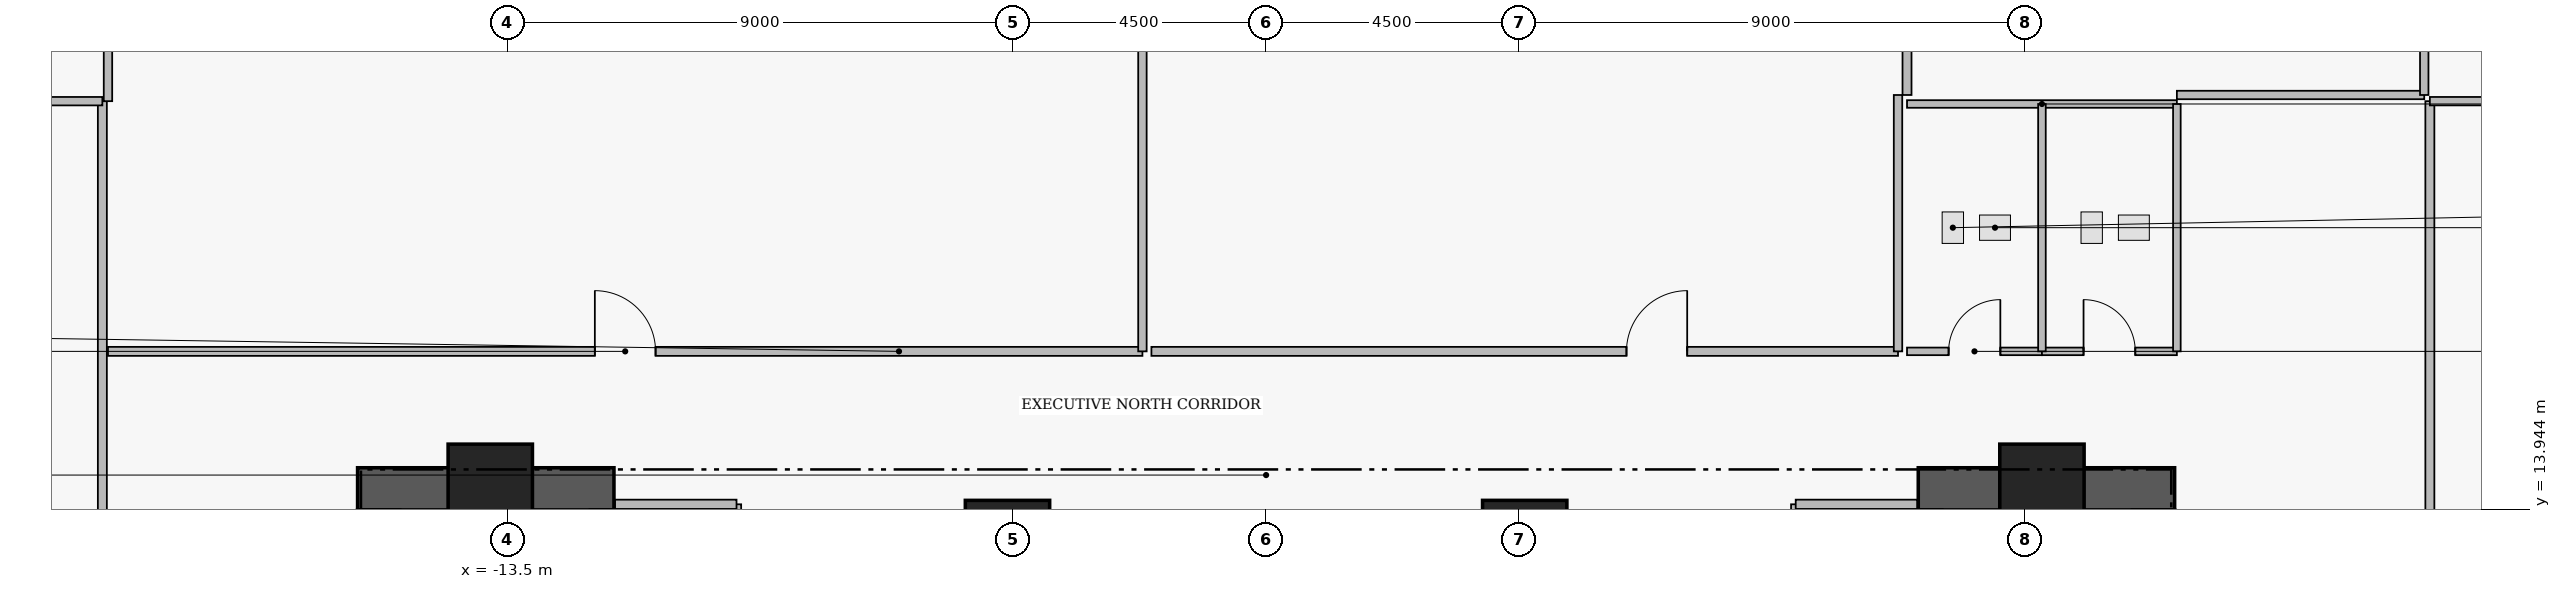
"""IFC4 building model, lengths in metres.
Left out: names, types, materials, properties, quantities, classifications, styles, units other than length and angle.
Written with IfcOpenShell. Run it as: python <this file> out.ifc"""

import sys

from ifc_helpers import new_model, si_unit, direction, frame, frame_2d, origin, origin_2d, place, context, subcontext, project, spatial, rectangle, extrude, element, fill, save


model = new_model("IFC4")
c1 = context("Model", 3, precision=1e-05, world=origin(), true_north=direction((0.0, 1.0)))
c2 = subcontext(c1, "Body", "Model", "MODEL_VIEW")
j1 = project(units=[si_unit("LENGTHUNIT", "METRE"), si_unit("PLANEANGLEUNIT", "RADIAN")], contexts=[c1])
p1 = place(None, origin())
s1 = spatial("IfcSite", under=j1, at=p1, CompositionType="ELEMENT")
p2 = place(p1, origin())
s2 = spatial("IfcBuilding", under=s1, at=p2, CompositionType="ELEMENT")
p3 = place(p2, frame((0.0, 0.0, 154.05)))
s3 = spatial("IfcBuildingStorey", under=s2, at=p3, CompositionType="ELEMENT", Elevation=154.05)
for number, where, z_axis, x_axis in (
    (1, (-16.16, 14.305, 0.0), (0.0, 0.0, 1.0), (1.0, 0.0, 0.0)),
    (2, (11.6, 14.305, 0.0), (0.0, 0.0, 1.0), (1.0, 0.0, 0.0)),
):
    element("IfcWall", number, at=place(p3, frame(where, z_axis=z_axis, x_axis=x_axis)), inside=s3, PredefinedType="SHEAR", context=c2, shape_type="SweptSolid", body=[
        extrude(rectangle(XDim=4.56, YDim=0.75, at=frame_2d((2.28, 0.0))), origin(), (0.0, 0.0, 1.0), 4.31),
    ])
for number, where, z_axis, x_axis in (
    (3, (-13.8, 14.35, 0.0), (0.0, 0.0, 1.0), (1.0, 0.0, 0.0)),
    (4, (-4.6, 13.35, 0.0), (0.0, 0.0, 1.0), (1.0, 0.0, 0.0)),
    (5, (4.6, 13.35, 0.0), (0.0, 0.0, 1.0), (1.0, 0.0, 0.0)),
    (6, (13.8, 14.35, 0.0), (0.0, 0.0, 1.0), (1.0, 0.0, 0.0)),
):
    element("IfcColumn", number, at=place(p3, frame(where, z_axis=z_axis, x_axis=x_axis)), inside=s3, PredefinedType="COLUMN", context=c2, shape_type="SweptSolid", body=[
        extrude(rectangle(XDim=1.5, YDim=1.5, at=origin_2d()), origin(), (0.0, 0.0, 1.0), 4.5),
    ])
p4 = place(p3, frame((-20.6, 16.75, 0.0), z_axis=(0.0, 0.0, 1.0), x_axis=(1.0, 0.0, 0.0)))
e7 = element("IfcWall", 7, at=p4, inside=s3, PredefinedType="PARTITIONING", context=c2, shape_type="SweptSolid", body=[
    extrude(rectangle(XDim=18.4, YDim=0.16, at=frame_2d((9.2, 0.0))), origin(), (0.0, 0.0, 1.0), 3.823),
])
p5 = place(p4, frame((8.66, 0.0, 0.0)))
e8 = element("IfcOpeningElement", 8, at=p5, cuts=e7, PredefinedType="OPENING", context=c2, shape_type="SweptSolid", body=[
    extrude(rectangle(XDim=1.08, YDim=2.18, at=frame_2d((0.54, 1.09))), frame((0.0, 0.09, 0.0), z_axis=(0.0, -1.0, 0.0), x_axis=(1.0, 0.0, 0.0)), (0.0, 0.0, 1.0), 0.18),
])
p6 = place(p3, frame((-2.04, 16.75, 0.0), z_axis=(0.0, 0.0, 1.0), x_axis=(1.0, 0.0, 0.0)))
e9 = element("IfcWall", 9, at=p6, inside=s3, PredefinedType="PARTITIONING", context=c2, shape_type="SweptSolid", body=[
    extrude(rectangle(XDim=13.28, YDim=0.16, at=frame_2d((6.64, 0.0))), origin(), (0.0, 0.0, 1.0), 3.823),
])
p7 = place(p6, frame((8.45, 0.0, 0.0)))
e10 = element("IfcOpeningElement", 10, at=p7, cuts=e9, PredefinedType="OPENING", context=c2, shape_type="SweptSolid", body=[
    extrude(rectangle(XDim=1.08, YDim=2.18, at=frame_2d((0.54, 1.09))), frame((0.0, 0.09, 0.0), z_axis=(0.0, -1.0, 0.0), x_axis=(1.0, 0.0, 0.0)), (0.0, 0.0, 1.0), 0.18),
])
p8 = place(p3, frame((20.7, -6.2, 0.0), z_axis=(0.0, 0.0, 1.0), x_axis=(0.0, 1.0, 0.0)))
e11 = element("IfcWall", 11, at=p8, inside=s3, PredefinedType="PARTITIONING", context=c2, shape_type="SweptSolid", body=[
    extrude(rectangle(XDim=27.4, YDim=0.16, at=frame_2d((13.7, 0.0))), origin(), (0.0, 0.0, 1.0), 4.28),
])
p9 = place(p8, frame((13.16, 0.0, 0.0)))
e12 = element("IfcOpeningElement", 12, at=p9, cuts=e11, PredefinedType="OPENING", context=c2, shape_type="SweptSolid", body=[
    extrude(rectangle(XDim=1.08, YDim=2.18, at=frame_2d((0.54, 1.09))), frame((0.0, 0.09, 0.0), z_axis=(0.0, -1.0, 0.0), x_axis=(1.0, 0.0, 0.0)), (0.0, 0.0, 1.0), 0.18),
])
p10 = place(p3, frame((-20.7, -6.2, 0.0), z_axis=(0.0, 0.0, 1.0), x_axis=(0.0, 1.0, 0.0)))
e13 = element("IfcWall", 13, at=p10, inside=s3, PredefinedType="PARTITIONING", context=c2, shape_type="SweptSolid", body=[
    extrude(rectangle(XDim=27.4, YDim=0.16, at=frame_2d((13.7, 0.0))), origin(), (0.0, 0.0, 1.0), 4.28),
])
p11 = place(p10, frame((13.16, 0.0, 0.0)))
e14 = element("IfcOpeningElement", 14, at=p11, cuts=e13, PredefinedType="OPENING", context=c2, shape_type="SweptSolid", body=[
    extrude(rectangle(XDim=1.08, YDim=2.18, at=frame_2d((0.54, 1.09))), frame((0.0, 0.09, 0.0), z_axis=(0.0, -1.0, 0.0), x_axis=(1.0, 0.0, 0.0)), (0.0, 0.0, 1.0), 0.18),
])
p12 = place(p3, frame((11.4, 16.75, 0.0), z_axis=(0.0, 0.0, 1.0), x_axis=(1.0, 0.0, 0.0)))
e15 = element("IfcWall", 15, at=p12, inside=s3, PredefinedType="PLUMBINGWALL", context=c2, shape_type="SweptSolid", body=[
    extrude(rectangle(XDim=2.4, YDim=0.135, at=frame_2d((1.2, 0.0))), origin(), (0.0, 0.0, 1.0), 3.823),
])
p13 = place(p12, frame((0.74, 0.0, 0.0)))
e16 = element("IfcOpeningElement", 16, at=p13, cuts=e15, PredefinedType="OPENING", context=c2, shape_type="SweptSolid", body=[
    extrude(rectangle(XDim=0.92, YDim=2.12, at=frame_2d((0.46, 1.06))), frame((0.0, 0.077, 0.0), z_axis=(0.0, -1.0, 0.0), x_axis=(1.0, 0.0, 0.0)), (0.0, 0.0, 1.0), 0.155),
])
p14 = place(p3, frame((13.8, 16.75, 0.0), z_axis=(0.0, 0.0, 1.0), x_axis=(1.0, 0.0, 0.0)))
e17 = element("IfcWall", 17, at=p14, inside=s3, PredefinedType="PLUMBINGWALL", context=c2, shape_type="SweptSolid", body=[
    extrude(rectangle(XDim=2.4, YDim=0.135, at=frame_2d((1.2, 0.0))), origin(), (0.0, 0.0, 1.0), 4.28),
])
p15 = place(p14, frame((0.74, 0.0, 0.0)))
e18 = element("IfcOpeningElement", 18, at=p15, cuts=e17, PredefinedType="OPENING", context=c2, shape_type="SweptSolid", body=[
    extrude(rectangle(XDim=0.92, YDim=2.12, at=frame_2d((0.46, 1.06))), frame((0.0, 0.077, 0.0), z_axis=(0.0, -1.0, 0.0), x_axis=(1.0, 0.0, 0.0)), (0.0, 0.0, 1.0), 0.155),
])
p16 = place(p3, frame((11.4, 21.31, 0.0), z_axis=(0.0, 0.0, 1.0), x_axis=(0.0, 1.0, 0.0)))
e19 = element("IfcWall", 19, at=p16, inside=s3, PredefinedType="PARTITIONING", context=c2, shape_type="SweptSolid", body=[
    extrude(rectangle(XDim=7.03, YDim=0.16, at=frame_2d((3.515, 0.0))), origin(), (0.0, 0.0, 1.0), 4.28),
])
p17 = place(p16, frame((2.975, 0.0, 0.0)))
e20 = element("IfcOpeningElement", 20, at=p17, cuts=e19, PredefinedType="OPENING", context=c2, shape_type="SweptSolid", body=[
    extrude(rectangle(XDim=1.08, YDim=2.18, at=frame_2d((0.54, 1.09))), frame((0.0, 0.09, 0.0), z_axis=(0.0, -1.0, 0.0), x_axis=(1.0, 0.0, 0.0)), (0.0, 0.0, 1.0), 0.18),
])
p18 = place(p3, frame((-9.42, 11.07, 0.0), z_axis=(0.0, 0.0, 1.0), x_axis=(0.0, 1.0, 0.0)))
e21 = element("IfcWall", 21, at=p18, inside=s3, PredefinedType="PARTITIONING", context=c2, shape_type="SweptSolid", body=[
    extrude(rectangle(XDim=2.96, YDim=0.165, at=frame_2d((1.48, 0.0))), origin(), (0.0, 0.0, 1.0), 4.28),
])
p19 = place(p3, frame((-11.58, 14.03, 0.0), z_axis=(0.0, 0.0, 1.0), x_axis=(1.0, 0.0, 0.0)))
e22 = element("IfcWall", 22, at=p19, inside=s3, PredefinedType="PARTITIONING", context=c2, shape_type="SweptSolid", body=[
    extrude(rectangle(XDim=2.16, YDim=0.165, at=frame_2d((1.08, 0.0))), origin(), (0.0, 0.0, 1.0), 4.28),
])
p20 = place(p3, frame((9.42, 11.07, 0.0), z_axis=(0.0, 0.0, 1.0), x_axis=(0.0, 1.0, 0.0)))
e23 = element("IfcWall", 23, at=p20, inside=s3, PredefinedType="PARTITIONING", context=c2, shape_type="SweptSolid", body=[
    extrude(rectangle(XDim=2.96, YDim=0.165, at=frame_2d((1.48, 0.0))), origin(), (0.0, 0.0, 1.0), 4.28),
])
p21 = place(p3, frame((9.42, 14.03, 0.0), z_axis=(0.0, 0.0, 1.0), x_axis=(1.0, 0.0, 0.0)))
e24 = element("IfcWall", 24, at=p21, inside=s3, PredefinedType="PARTITIONING", context=c2, shape_type="SweptSolid", body=[
    extrude(rectangle(XDim=2.16, YDim=0.165, at=frame_2d((1.08, 0.0))), origin(), (0.0, 0.0, 1.0), 4.28),
])
p22 = place(p3, frame((-20.6, 21.2, 0.0), z_axis=(0.0, 0.0, 1.0), x_axis=(0.0, 1.0, 0.0)))
e25 = element("IfcWall", 25, at=p22, inside=s3, PredefinedType="PARTITIONING", context=c2, shape_type="SweptSolid", body=[
    extrude(rectangle(XDim=3.64, YDim=0.15, at=frame_2d((1.82, 0.0))), origin(), (0.0, 0.0, 1.0), 4.28),
])
p23 = place(p3, frame((-2.2, 16.75, 0.0), z_axis=(0.0, 0.0, 1.0), x_axis=(0.0, 1.0, 0.0)))
e26 = element("IfcWall", 26, at=p23, inside=s3, PredefinedType="PARTITIONING", context=c2, shape_type="SweptSolid", body=[
    extrude(rectangle(XDim=11.59, YDim=0.15, at=frame_2d((5.795, 0.0))), origin(), (0.0, 0.0, 1.0), 4.28),
])
p24 = place(p3, frame((11.24, 16.75, 0.0), z_axis=(0.0, 0.0, 1.0), x_axis=(0.0, 1.0, 0.0)))
e27 = element("IfcWall", 27, at=p24, inside=s3, PredefinedType="PARTITIONING", context=c2, shape_type="SweptSolid", body=[
    extrude(rectangle(XDim=4.56, YDim=0.15, at=frame_2d((2.28, 0.0))), origin(), (0.0, 0.0, 1.0), 4.28),
])
for number, where, z_axis, x_axis in (
    (28, (20.7, 21.2, 0.0), (0.0, 0.0, 1.0), (1.0, 0.0, 0.0)),
    (29, (-23.84, 21.2, 0.0), (0.0, 0.0, 1.0), (1.0, 0.0, 0.0)),
):
    element("IfcWall", number, at=place(p3, frame(where, z_axis=z_axis, x_axis=x_axis)), inside=s3, PredefinedType="PARTITIONING", context=c2, shape_type="SweptSolid", body=[
        extrude(rectangle(XDim=3.14, YDim=0.15, at=frame_2d((1.57, 0.0))), origin(), (0.0, 0.0, 1.0), 4.28),
    ])
p25 = place(p3, frame((11.4, 21.15, 0.0), z_axis=(0.0, 0.0, 1.0), x_axis=(1.0, 0.0, 0.0)))
e30 = element("IfcWall", 30, at=p25, inside=s3, PredefinedType="PLUMBINGWALL", context=c2, shape_type="SweptSolid", body=[
    extrude(rectangle(XDim=4.8, YDim=0.135, at=frame_2d((2.4, 0.0))), origin(), (0.0, 0.0, 1.0), 4.28),
])
p26 = place(p3, frame((16.2, 16.75, 0.0), z_axis=(0.0, 0.0, 1.0), x_axis=(0.0, 1.0, 0.0)))
e31 = element("IfcWall", 31, at=p26, inside=s3, PredefinedType="PLUMBINGWALL", context=c2, shape_type="SweptSolid", body=[
    extrude(rectangle(XDim=4.4, YDim=0.135, at=frame_2d((2.2, 0.0))), origin(), (0.0, 0.0, 1.0), 4.28),
])
p27 = place(p3, frame((13.8, 16.75, 0.0), z_axis=(0.0, 0.0, 1.0), x_axis=(0.0, 1.0, 0.0)))
e32 = element("IfcWall", 32, at=p27, inside=s3, PredefinedType="PLUMBINGWALL", context=c2, shape_type="SweptSolid", body=[
    extrude(rectangle(XDim=4.4, YDim=0.135, at=frame_2d((2.2, 0.0))), origin(), (0.0, 0.0, 1.0), 3.353),
])
p28 = place(p3, frame((16.2, 21.31, 0.0), z_axis=(0.0, 0.0, 1.0), x_axis=(1.0, 0.0, 0.0)))
e33 = element("IfcWall", 33, at=p28, inside=s3, PredefinedType="PARTITIONING", context=c2, shape_type="SweptSolid", body=[
    extrude(rectangle(XDim=4.4, YDim=0.15, at=frame_2d((2.2, 0.0))), origin(), (0.0, 0.0, 1.0), 4.28),
])
p29 = place(p3, frame((20.6, 21.31, 0.0), z_axis=(0.0, 0.0, 1.0), x_axis=(0.0, 1.0, 0.0)))
e34 = element("IfcWall", 34, at=p29, inside=s3, PredefinedType="PARTITIONING", context=c2, shape_type="SweptSolid", body=[
    extrude(rectangle(XDim=3.53, YDim=0.15, at=frame_2d((1.765, 0.0))), origin(), (0.0, 0.0, 1.0), 4.28),
])
p30 = place(p5, origin())
e35 = element("IfcDoor", 35, at=p30, inside=s3, OperationType="SINGLE_SWING_LEFT", PredefinedType="DOOR", context=c2, shape_type="SweptSolid", body=[
    extrude(rectangle(XDim=1.08, YDim=2.18, at=frame_2d((0.54, 1.09))), frame((0.0, 0.025, 0.0), z_axis=(0.0, -1.0, 0.0), x_axis=(1.0, 0.0, 0.0)), (0.0, 0.0, 1.0), 0.05),
])
fill(e8, e35)
p31 = place(p7, origin())
e36 = element("IfcDoor", 36, at=p31, inside=s3, OperationType="SINGLE_SWING_RIGHT", PredefinedType="DOOR", context=c2, shape_type="SweptSolid", body=[
    extrude(rectangle(XDim=1.08, YDim=2.18, at=frame_2d((0.54, 1.09))), frame((0.0, 0.025, 0.0), z_axis=(0.0, -1.0, 0.0), x_axis=(1.0, 0.0, 0.0)), (0.0, 0.0, 1.0), 0.05),
])
fill(e10, e36)
p32 = place(p13, origin())
e37 = element("IfcDoor", 37, at=p32, inside=s3, OperationType="SINGLE_SWING_RIGHT", PredefinedType="DOOR", context=c2, shape_type="SweptSolid", body=[
    extrude(rectangle(XDim=0.92, YDim=2.12, at=frame_2d((0.46, 1.06))), frame((0.0, 0.025, 0.0), z_axis=(0.0, -1.0, 0.0), x_axis=(1.0, 0.0, 0.0)), (0.0, 0.0, 1.0), 0.05),
])
fill(e16, e37)
p33 = place(p15, origin())
e38 = element("IfcDoor", 38, at=p33, inside=s3, OperationType="SINGLE_SWING_LEFT", PredefinedType="DOOR", context=c2, shape_type="SweptSolid", body=[
    extrude(rectangle(XDim=0.92, YDim=2.12, at=frame_2d((0.46, 1.06))), frame((0.0, 0.025, 0.0), z_axis=(0.0, -1.0, 0.0), x_axis=(1.0, 0.0, 0.0)), (0.0, 0.0, 1.0), 0.05),
])
fill(e18, e38)
save(model, sys.argv[1])
